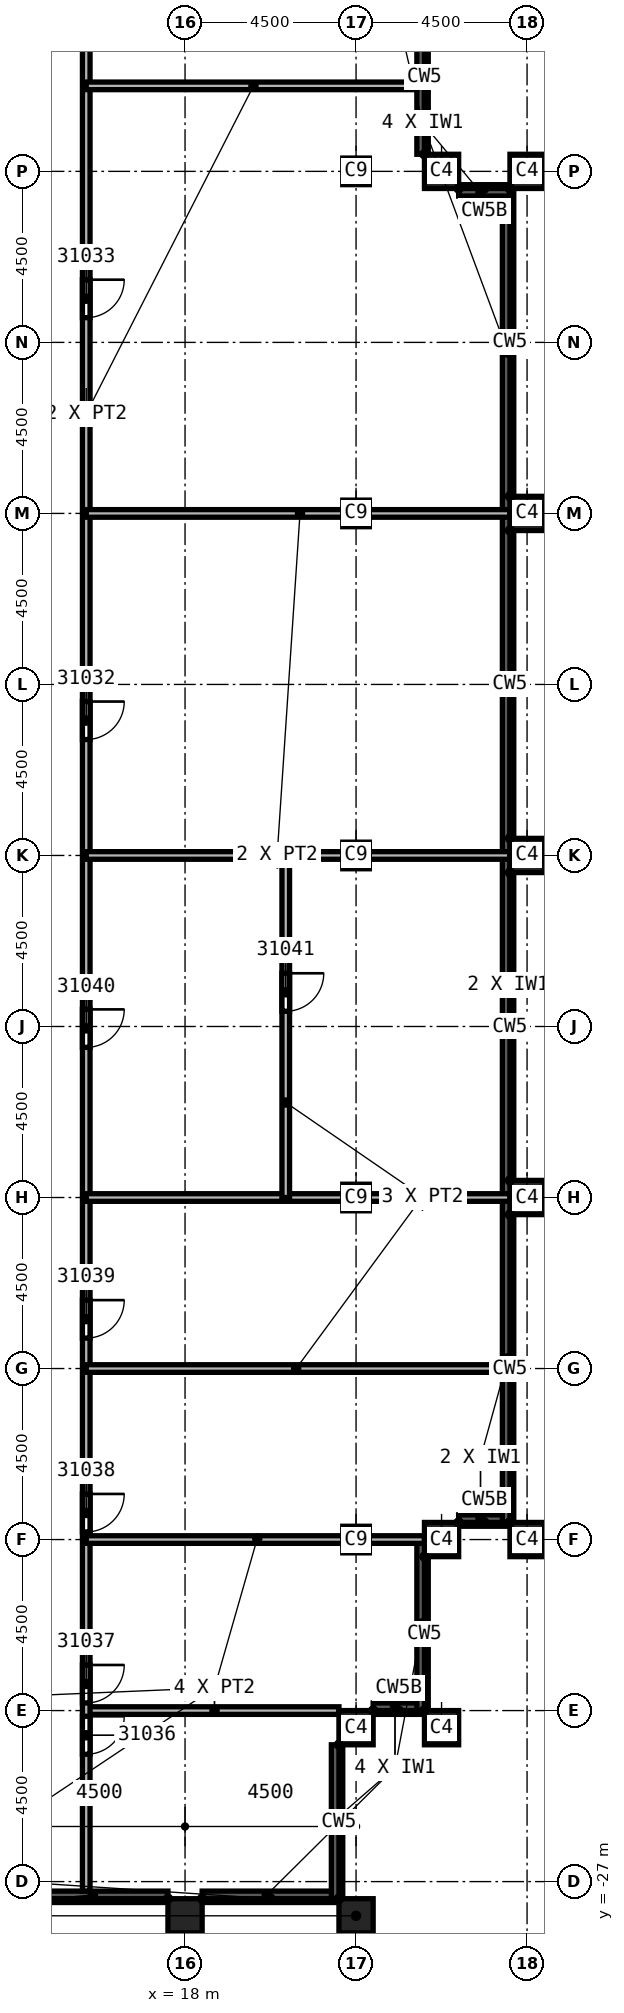
"""IFC4 building model, lengths in metres.
Left out: names, types, materials, properties, quantities, classifications, styles, units other than length and angle.
Written with IfcOpenShell. Run it as: python <this file> out.ifc"""

import sys

from ifc_helpers import new_model, si_unit, direction, frame, frame_2d, origin, origin_2d, place, context, subcontext, project, spatial, rectangle, extrude, element, fill, save


model = new_model("IFC4")
c1 = context("Model", 3, precision=1e-05, world=origin(), true_north=direction((0.0, 1.0)))
c2 = subcontext(c1, "Body", "Model", "MODEL_VIEW")
j1 = project(units=[si_unit("LENGTHUNIT", "METRE"), si_unit("PLANEANGLEUNIT", "RADIAN")], contexts=[c1])
p1 = place(None, origin())
s1 = spatial("IfcSite", under=j1, at=p1, CompositionType="ELEMENT")
p2 = place(p1, origin())
s2 = spatial("IfcBuilding", under=s1, at=p2, CompositionType="ELEMENT")
p3 = place(p2, frame((0.0, 0.0, 350.0)))
s3 = spatial("IfcBuildingStorey", under=s2, at=p3, CompositionType="ELEMENT", Elevation=350.0)
for number, where, z_axis, x_axis in (
    (1, (22.5, 0.0, 0.0), (0.0, 0.0, 1.0), (1.0, 0.0, 0.0)),
    (2, (22.5, 9.0, 0.0), (0.0, 0.0, 1.0), (1.0, 0.0, 0.0)),
    (3, (22.5, 18.0, 0.0), (0.0, 0.0, 1.0), (1.0, 0.0, 0.0)),
    (4, (22.5, -9.0, 0.0), (0.0, 0.0, 1.0), (1.0, 0.0, 0.0)),
    (5, (22.5, -18.0, 0.0), (0.0, 0.0, 1.0), (1.0, 0.0, 0.0)),
):
    element("IfcColumn", number, at=place(p3, frame(where, z_axis=z_axis, x_axis=x_axis)), inside=s3, PredefinedType="COLUMN", context=c2, shape_type="SweptSolid", body=[
        extrude(rectangle(XDim=0.7, YDim=0.7, at=origin_2d()), origin(), (0.0, 0.0, 1.0), 5.6),
    ])
for number, where, z_axis, x_axis in (
    (6, (27.0, 0.0, 0.0), (0.0, 0.0, 1.0), (0.0, 1.0, 0.0)),
    (7, (27.0, 9.0, 0.0), (0.0, 0.0, 1.0), (0.0, 1.0, 0.0)),
    (8, (27.0, 18.0, 0.0), (0.0, 0.0, 1.0), (0.0, 1.0, 0.0)),
    (9, (27.0, -9.0, 0.0), (0.0, 0.0, 1.0), (0.0, 1.0, 0.0)),
    (10, (27.0, -18.0, 0.0), (0.0, 0.0, 1.0), (0.0, 1.0, 0.0)),
    (11, (18.0, -27.9, 0.0), (0.0, 0.0, 1.0), (1.0, 0.0, 0.0)),
    (12, (22.5, -27.9, 0.0), (0.0, 0.0, 1.0), (1.0, 0.0, 0.0)),
    (13, (24.75, 18.0, 0.0), (0.0, 0.0, 1.0), (1.0, 0.0, 0.0)),
    (14, (22.5, -22.95, 0.0), (0.0, 0.0, 1.0), (1.0, 0.0, 0.0)),
    (15, (24.75, -22.95, 0.0), (0.0, 0.0, 1.0), (1.0, 0.0, 0.0)),
    (16, (24.75, -18.0, 0.0), (0.0, 0.0, 1.0), (1.0, 0.0, 0.0)),
):
    element("IfcColumn", number, at=place(p3, frame(where, z_axis=z_axis, x_axis=x_axis)), inside=s3, PredefinedType="COLUMN", context=c2, shape_type="SweptSolid", body=[
        extrude(rectangle(XDim=0.9, YDim=0.9, at=origin_2d()), origin(), (0.0, 0.0, 1.0), 5.6),
    ])
p4 = place(p3, frame((13.55, -27.4, 0.0), z_axis=(0.0, 0.0, 1.0), x_axis=(1.0, 0.0, 0.0)))
e17 = element("IfcWall", 17, at=p4, inside=s3, PredefinedType="SOLIDWALL", context=c2, shape_type="SweptSolid", body=[
    extrude(rectangle(XDim=4.0, YDim=0.3, at=frame_2d((2.0, 0.0))), origin(), (0.0, 0.0, 1.0), 1.1),
])
p5 = place(p3, frame((18.45, -27.4, 0.0), z_axis=(0.0, 0.0, 1.0), x_axis=(1.0, 0.0, 0.0)))
e18 = element("IfcWall", 18, at=p5, inside=s3, PredefinedType="SOLIDWALL", context=c2, shape_type="SweptSolid", body=[
    extrude(rectangle(XDim=3.6, YDim=0.3, at=frame_2d((1.8, 0.0))), origin(), (0.0, 0.0, 1.0), 1.1),
])
p6 = place(p3, frame((22.0, -27.45, 0.0), z_axis=(0.0, 0.0, 1.0), x_axis=(0.0, 1.0, 0.0)))
e19 = element("IfcWall", 19, at=p6, inside=s3, PredefinedType="SOLIDWALL", context=c2, shape_type="SweptSolid", body=[
    extrude(rectangle(XDim=4.05, YDim=0.3, at=frame_2d((2.025, 0.0))), origin(), (0.0, 0.0, 1.0), 1.1),
])
p7 = place(p3, frame((22.95, -22.45, 0.0), z_axis=(0.0, 0.0, 1.0), x_axis=(1.0, 0.0, 0.0)))
e20 = element("IfcWall", 20, at=p7, inside=s3, PredefinedType="SOLIDWALL", context=c2, shape_type="SweptSolid", body=[
    extrude(rectangle(XDim=1.35, YDim=0.3, at=frame_2d((0.675, 0.0))), origin(), (0.0, 0.0, 1.0), 1.1),
])
p8 = place(p3, frame((24.25, -22.5, 0.0), z_axis=(0.0, 0.0, 1.0), x_axis=(0.0, 1.0, 0.0)))
e21 = element("IfcWall", 21, at=p8, inside=s3, PredefinedType="SOLIDWALL", context=c2, shape_type="SweptSolid", body=[
    extrude(rectangle(XDim=4.45, YDim=0.3, at=frame_2d((2.225, 0.0))), origin(), (0.0, 0.0, 1.0), 1.1),
])
p9 = place(p3, frame((25.2, -17.5, 0.0), z_axis=(0.0, 0.0, 1.0), x_axis=(1.0, 0.0, 0.0)))
e22 = element("IfcWall", 22, at=p9, inside=s3, PredefinedType="SOLIDWALL", context=c2, shape_type="SweptSolid", body=[
    extrude(rectangle(XDim=1.35, YDim=0.3, at=frame_2d((0.675, 0.0))), origin(), (0.0, 0.0, 1.0), 1.1),
])
p10 = place(p3, frame((26.5, -17.55, 0.0), z_axis=(0.0, 0.0, 1.0), x_axis=(0.0, 1.0, 0.0)))
e23 = element("IfcWall", 23, at=p10, inside=s3, PredefinedType="SOLIDWALL", context=c2, shape_type="SweptSolid", body=[
    extrude(rectangle(XDim=8.5, YDim=0.3, at=frame_2d((4.25, 0.0))), origin(), (0.0, 0.0, 1.0), 1.1),
])
for number, where, z_axis, x_axis in (
    (24, (26.5, -8.95, 0.0), (0.0, 0.0, 1.0), (0.0, 1.0, 0.0)),
    (25, (26.5, 0.05, 0.0), (0.0, 0.0, 1.0), (0.0, 1.0, 0.0)),
):
    element("IfcWall", number, at=place(p3, frame(where, z_axis=z_axis, x_axis=x_axis)), inside=s3, PredefinedType="SOLIDWALL", context=c2, shape_type="SweptSolid", body=[
        extrude(rectangle(XDim=8.9, YDim=0.3, at=frame_2d((4.45, 0.0))), origin(), (0.0, 0.0, 1.0), 1.1),
    ])
p11 = place(p3, frame((26.5, 9.05, 0.0), z_axis=(0.0, 0.0, 1.0), x_axis=(0.0, 1.0, 0.0)))
e26 = element("IfcWall", 26, at=p11, inside=s3, PredefinedType="SOLIDWALL", context=c2, shape_type="SweptSolid", body=[
    extrude(rectangle(XDim=8.5, YDim=0.3, at=frame_2d((4.25, 0.0))), origin(), (0.0, 0.0, 1.0), 1.1),
])
p12 = place(p3, frame((26.55, 17.5, 0.0), z_axis=(0.0, 0.0, 1.0), x_axis=(-1.0, 0.0, 0.0)))
e27 = element("IfcWall", 27, at=p12, inside=s3, PredefinedType="SOLIDWALL", context=c2, shape_type="SweptSolid", body=[
    extrude(rectangle(XDim=1.35, YDim=0.3, at=frame_2d((0.675, 0.0))), origin(), (0.0, 0.0, 1.0), 1.1),
])
p13 = place(p3, frame((24.25, 18.45, 0.0), z_axis=(0.0, 0.0, 1.0), x_axis=(0.0, 1.0, 0.0)))
e28 = element("IfcWall", 28, at=p13, inside=s3, PredefinedType="SOLIDWALL", context=c2, shape_type="SweptSolid", body=[
    extrude(rectangle(XDim=4.05, YDim=0.3, at=frame_2d((2.025, 0.0))), origin(), (0.0, 0.0, 1.0), 1.1),
])
p14 = place(p3, frame((15.4, -22.5, 0.0), z_axis=(0.0, 0.0, 1.0), x_axis=(1.0, 0.0, 0.0)))
e29 = element("IfcWall", 29, at=p14, inside=s3, PredefinedType="PARTITIONING", context=c2, shape_type="SweptSolid", body=[
    extrude(rectangle(XDim=6.65, YDim=0.2, at=frame_2d((3.325, 0.0))), origin(), (0.0, 0.0, 1.0), 5.6),
])
p15 = place(p3, frame((15.4, 27.25, 0.0), z_axis=(0.0, 0.0, 1.0), x_axis=(0.0, -1.0, 0.0)))
e30 = element("IfcWall", 30, at=p15, inside=s3, PredefinedType="PARTITIONING", context=c2, shape_type="SweptSolid", body=[
    extrude(rectangle(XDim=54.5, YDim=0.2, at=frame_2d((27.25, 0.0))), origin(), (0.0, 0.0, 1.0), 5.6),
])
p16 = place(p15, frame((23.2, 0.0, 0.0)))
e31 = element("IfcOpeningElement", 31, at=p16, cuts=e30, PredefinedType="OPENING", context=c2, shape_type="SweptSolid", body=[
    extrude(rectangle(XDim=1.0, YDim=2.1, at=frame_2d((0.5, 1.05))), frame((0.0, 0.1, 0.0), z_axis=(0.0, -1.0, 0.0), x_axis=(1.0, 0.0, 0.0)), (0.0, 0.0, 1.0), 0.2),
])
p17 = place(p15, frame((12.1, 0.0, 0.0)))
e32 = element("IfcOpeningElement", 32, at=p17, cuts=e30, PredefinedType="OPENING", context=c2, shape_type="SweptSolid", body=[
    extrude(rectangle(XDim=1.0, YDim=2.1, at=frame_2d((0.5, 1.05))), frame((0.0, 0.1, 0.0), z_axis=(0.0, -1.0, 0.0), x_axis=(1.0, 0.0, 0.0)), (0.0, 0.0, 1.0), 0.2),
])
p18 = place(p15, frame((3.625, 0.0, 0.0)))
e33 = element("IfcOpeningElement", 33, at=p18, cuts=e30, PredefinedType="OPENING", context=c2, shape_type="SweptSolid", body=[
    extrude(rectangle(XDim=1.0, YDim=2.1, at=frame_2d((0.5, 1.05))), frame((0.0, 0.1, 0.0), z_axis=(0.0, -1.0, 0.0), x_axis=(1.0, 0.0, 0.0)), (0.0, 0.0, 1.0), 0.2),
])
p19 = place(p15, frame((0.25, 0.0, 0.0)))
e34 = element("IfcOpeningElement", 34, at=p19, cuts=e30, PredefinedType="OPENING", context=c2, shape_type="SweptSolid", body=[
    extrude(rectangle(XDim=1.0, YDim=2.1, at=frame_2d((0.5, 1.05))), frame((0.0, 0.1, 0.0), z_axis=(0.0, -1.0, 0.0), x_axis=(1.0, 0.0, 0.0)), (0.0, 0.0, 1.0), 0.2),
])
p20 = place(p15, frame((49.9, 0.0, 0.0)))
e35 = element("IfcOpeningElement", 35, at=p20, cuts=e30, PredefinedType="OPENING", context=c2, shape_type="SweptSolid", body=[
    extrude(rectangle(XDim=1.0, YDim=2.1, at=frame_2d((0.5, 1.05))), frame((0.0, 0.1, 0.0), z_axis=(0.0, -1.0, 0.0), x_axis=(1.0, 0.0, 0.0)), (0.0, 0.0, 1.0), 0.2),
])
p21 = place(p15, frame((48.55, 0.0, 0.0)))
e36 = element("IfcOpeningElement", 36, at=p21, cuts=e30, PredefinedType="OPENING", context=c2, shape_type="SweptSolid", body=[
    extrude(rectangle(XDim=1.0, YDim=2.1, at=frame_2d((0.5, 1.05))), frame((0.0, 0.1, 0.0), z_axis=(0.0, -1.0, 0.0), x_axis=(1.0, 0.0, 0.0)), (0.0, 0.0, 1.0), 0.2),
])
p22 = place(p15, frame((44.05, 0.0, 0.0)))
e37 = element("IfcOpeningElement", 37, at=p22, cuts=e30, PredefinedType="OPENING", context=c2, shape_type="SweptSolid", body=[
    extrude(rectangle(XDim=1.0, YDim=2.1, at=frame_2d((0.5, 1.05))), frame((0.0, 0.1, 0.0), z_axis=(0.0, -1.0, 0.0), x_axis=(1.0, 0.0, 0.0)), (0.0, 0.0, 1.0), 0.2),
])
p23 = place(p15, frame((38.95, 0.0, 0.0)))
e38 = element("IfcOpeningElement", 38, at=p23, cuts=e30, PredefinedType="OPENING", context=c2, shape_type="SweptSolid", body=[
    extrude(rectangle(XDim=1.0, YDim=2.1, at=frame_2d((0.5, 1.05))), frame((0.0, 0.1, 0.0), z_axis=(0.0, -1.0, 0.0), x_axis=(1.0, 0.0, 0.0)), (0.0, 0.0, 1.0), 0.2),
])
p24 = place(p15, frame((31.3, 0.0, 0.0)))
e39 = element("IfcOpeningElement", 39, at=p24, cuts=e30, PredefinedType="OPENING", context=c2, shape_type="SweptSolid", body=[
    extrude(rectangle(XDim=1.0, YDim=2.1, at=frame_2d((0.5, 1.05))), frame((0.0, 0.1, 0.0), z_axis=(0.0, -1.0, 0.0), x_axis=(1.0, 0.0, 0.0)), (0.0, 0.0, 1.0), 0.2),
])
p25 = place(p3, frame((15.4, -18.0, 0.0), z_axis=(0.0, 0.0, 1.0), x_axis=(1.0, 0.0, 0.0)))
e40 = element("IfcWall", 40, at=p25, inside=s3, PredefinedType="PARTITIONING", context=c2, shape_type="SweptSolid", body=[
    extrude(rectangle(XDim=8.9, YDim=0.2, at=frame_2d((4.45, 0.0))), origin(), (0.0, 0.0, 1.0), 5.6),
])
p26 = place(p3, frame((15.4, -13.5, 0.0), z_axis=(0.0, 0.0, 1.0), x_axis=(1.0, 0.0, 0.0)))
e41 = element("IfcWall", 41, at=p26, inside=s3, PredefinedType="PARTITIONING", context=c2, shape_type="SweptSolid", body=[
    extrude(rectangle(XDim=10.95, YDim=0.2, at=frame_2d((5.475, 0.0))), origin(), (0.0, 0.0, 1.0), 5.6),
])
for number, where, z_axis, x_axis in (
    (42, (15.4, -9.0, 0.0), (0.0, 0.0, 1.0), (1.0, 0.0, 0.0)),
    (43, (15.4, 9.0, 0.0), (0.0, 0.0, 1.0), (1.0, 0.0, 0.0)),
):
    element("IfcWall", number, at=place(p3, frame(where, z_axis=z_axis, x_axis=x_axis)), inside=s3, PredefinedType="PARTITIONING", context=c2, shape_type="SweptSolid", body=[
        extrude(rectangle(XDim=11.15, YDim=0.2, at=frame_2d((5.575, 0.0))), origin(), (0.0, 0.0, 1.0), 5.6),
    ])
p27 = place(p3, frame((15.4, 20.25, 0.0), z_axis=(0.0, 0.0, 1.0), x_axis=(1.0, 0.0, 0.0)))
e44 = element("IfcWall", 44, at=p27, inside=s3, PredefinedType="PARTITIONING", context=c2, shape_type="SweptSolid", body=[
    extrude(rectangle(XDim=8.7, YDim=0.2, at=frame_2d((4.35, 0.0))), origin(), (0.0, 0.0, 1.0), 5.6),
])
p28 = place(p3, frame((20.65, 0.0, 0.0), z_axis=(0.0, 0.0, 1.0), x_axis=(0.0, -1.0, 0.0)))
e45 = element("IfcWall", 45, at=p28, inside=s3, PredefinedType="PARTITIONING", context=c2, shape_type="SweptSolid", body=[
    extrude(rectangle(XDim=9.0, YDim=0.2, at=frame_2d((4.5, 0.0))), origin(), (0.0, 0.0, 1.0), 5.6),
])
p29 = place(p28, frame((3.1, 0.0, 0.0)))
e46 = element("IfcOpeningElement", 46, at=p29, cuts=e45, PredefinedType="OPENING", context=c2, shape_type="SweptSolid", body=[
    extrude(rectangle(XDim=1.0, YDim=2.1, at=frame_2d((0.5, 1.05))), frame((0.0, 0.1, 0.0), z_axis=(0.0, -1.0, 0.0), x_axis=(1.0, 0.0, 0.0)), (0.0, 0.0, 1.0), 0.2),
])
p30 = place(p3, frame((26.55, 0.0, 0.0), z_axis=(0.0, 0.0, 1.0), x_axis=(-1.0, 0.0, 0.0)))
e47 = element("IfcWall", 47, at=p30, inside=s3, PredefinedType="PARTITIONING", context=c2, shape_type="SweptSolid", body=[
    extrude(rectangle(XDim=11.15, YDim=0.2, at=frame_2d((5.575, 0.0))), origin(), (0.0, 0.0, 1.0), 5.6),
])
p31 = place(p16, origin())
e48 = element("IfcDoor", 48, at=p31, inside=s3, OperationType="SINGLE_SWING_LEFT", PredefinedType="DOOR", context=c2, shape_type="SweptSolid", body=[
    extrude(rectangle(XDim=1.0, YDim=2.1, at=frame_2d((0.5, 1.05))), frame((0.0, 0.025, 0.0), z_axis=(0.0, -1.0, 0.0), x_axis=(1.0, 0.0, 0.0)), (0.0, 0.0, 1.0), 0.05),
])
fill(e31, e48)
p32 = place(p17, origin())
e49 = element("IfcDoor", 49, at=p32, inside=s3, OperationType="SINGLE_SWING_RIGHT", PredefinedType="DOOR", context=c2, shape_type="SweptSolid", body=[
    extrude(rectangle(XDim=1.0, YDim=2.1, at=frame_2d((0.5, 1.05))), frame((0.0, 0.025, 0.0), z_axis=(0.0, -1.0, 0.0), x_axis=(1.0, 0.0, 0.0)), (0.0, 0.0, 1.0), 0.05),
])
fill(e32, e49)
p33 = place(p20, origin())
e50 = element("IfcDoor", 50, at=p33, inside=s3, OperationType="SINGLE_SWING_LEFT", PredefinedType="DOOR", context=c2, shape_type="SweptSolid", body=[
    extrude(rectangle(XDim=1.0, YDim=2.1, at=frame_2d((0.5, 1.05))), frame((0.0, 0.025, 0.0), z_axis=(0.0, -1.0, 0.0), x_axis=(1.0, 0.0, 0.0)), (0.0, 0.0, 1.0), 0.05),
])
fill(e35, e50)
p34 = place(p21, origin())
e51 = element("IfcDoor", 51, at=p34, inside=s3, OperationType="SINGLE_SWING_RIGHT", PredefinedType="DOOR", context=c2, shape_type="SweptSolid", body=[
    extrude(rectangle(XDim=1.0, YDim=2.1, at=frame_2d((0.5, 1.05))), frame((0.0, 0.025, 0.0), z_axis=(0.0, -1.0, 0.0), x_axis=(1.0, 0.0, 0.0)), (0.0, 0.0, 1.0), 0.05),
])
fill(e36, e51)
p35 = place(p22, origin())
e52 = element("IfcDoor", 52, at=p35, inside=s3, OperationType="SINGLE_SWING_LEFT", PredefinedType="DOOR", context=c2, shape_type="SweptSolid", body=[
    extrude(rectangle(XDim=1.0, YDim=2.1, at=frame_2d((0.5, 1.05))), frame((0.0, 0.025, 0.0), z_axis=(0.0, -1.0, 0.0), x_axis=(1.0, 0.0, 0.0)), (0.0, 0.0, 1.0), 0.05),
])
fill(e37, e52)
p36 = place(p23, origin())
e53 = element("IfcDoor", 53, at=p36, inside=s3, OperationType="SINGLE_SWING_RIGHT", PredefinedType="DOOR", context=c2, shape_type="SweptSolid", body=[
    extrude(rectangle(XDim=1.0, YDim=2.1, at=frame_2d((0.5, 1.05))), frame((0.0, 0.025, 0.0), z_axis=(0.0, -1.0, 0.0), x_axis=(1.0, 0.0, 0.0)), (0.0, 0.0, 1.0), 0.05),
])
fill(e38, e53)
p37 = place(p24, origin())
e54 = element("IfcDoor", 54, at=p37, inside=s3, OperationType="SINGLE_SWING_LEFT", PredefinedType="DOOR", context=c2, shape_type="SweptSolid", body=[
    extrude(rectangle(XDim=1.0, YDim=2.1, at=frame_2d((0.5, 1.05))), frame((0.0, 0.025, 0.0), z_axis=(0.0, -1.0, 0.0), x_axis=(1.0, 0.0, 0.0)), (0.0, 0.0, 1.0), 0.05),
])
fill(e39, e54)
p38 = place(p29, origin())
e55 = element("IfcDoor", 55, at=p38, inside=s3, OperationType="SINGLE_SWING_RIGHT", PredefinedType="DOOR", context=c2, shape_type="SweptSolid", body=[
    extrude(rectangle(XDim=1.0, YDim=2.1, at=frame_2d((0.5, 1.05))), frame((0.0, 0.025, 0.0), z_axis=(0.0, -1.0, 0.0), x_axis=(1.0, 0.0, 0.0)), (0.0, 0.0, 1.0), 0.05),
])
fill(e46, e55)
save(model, sys.argv[1])
